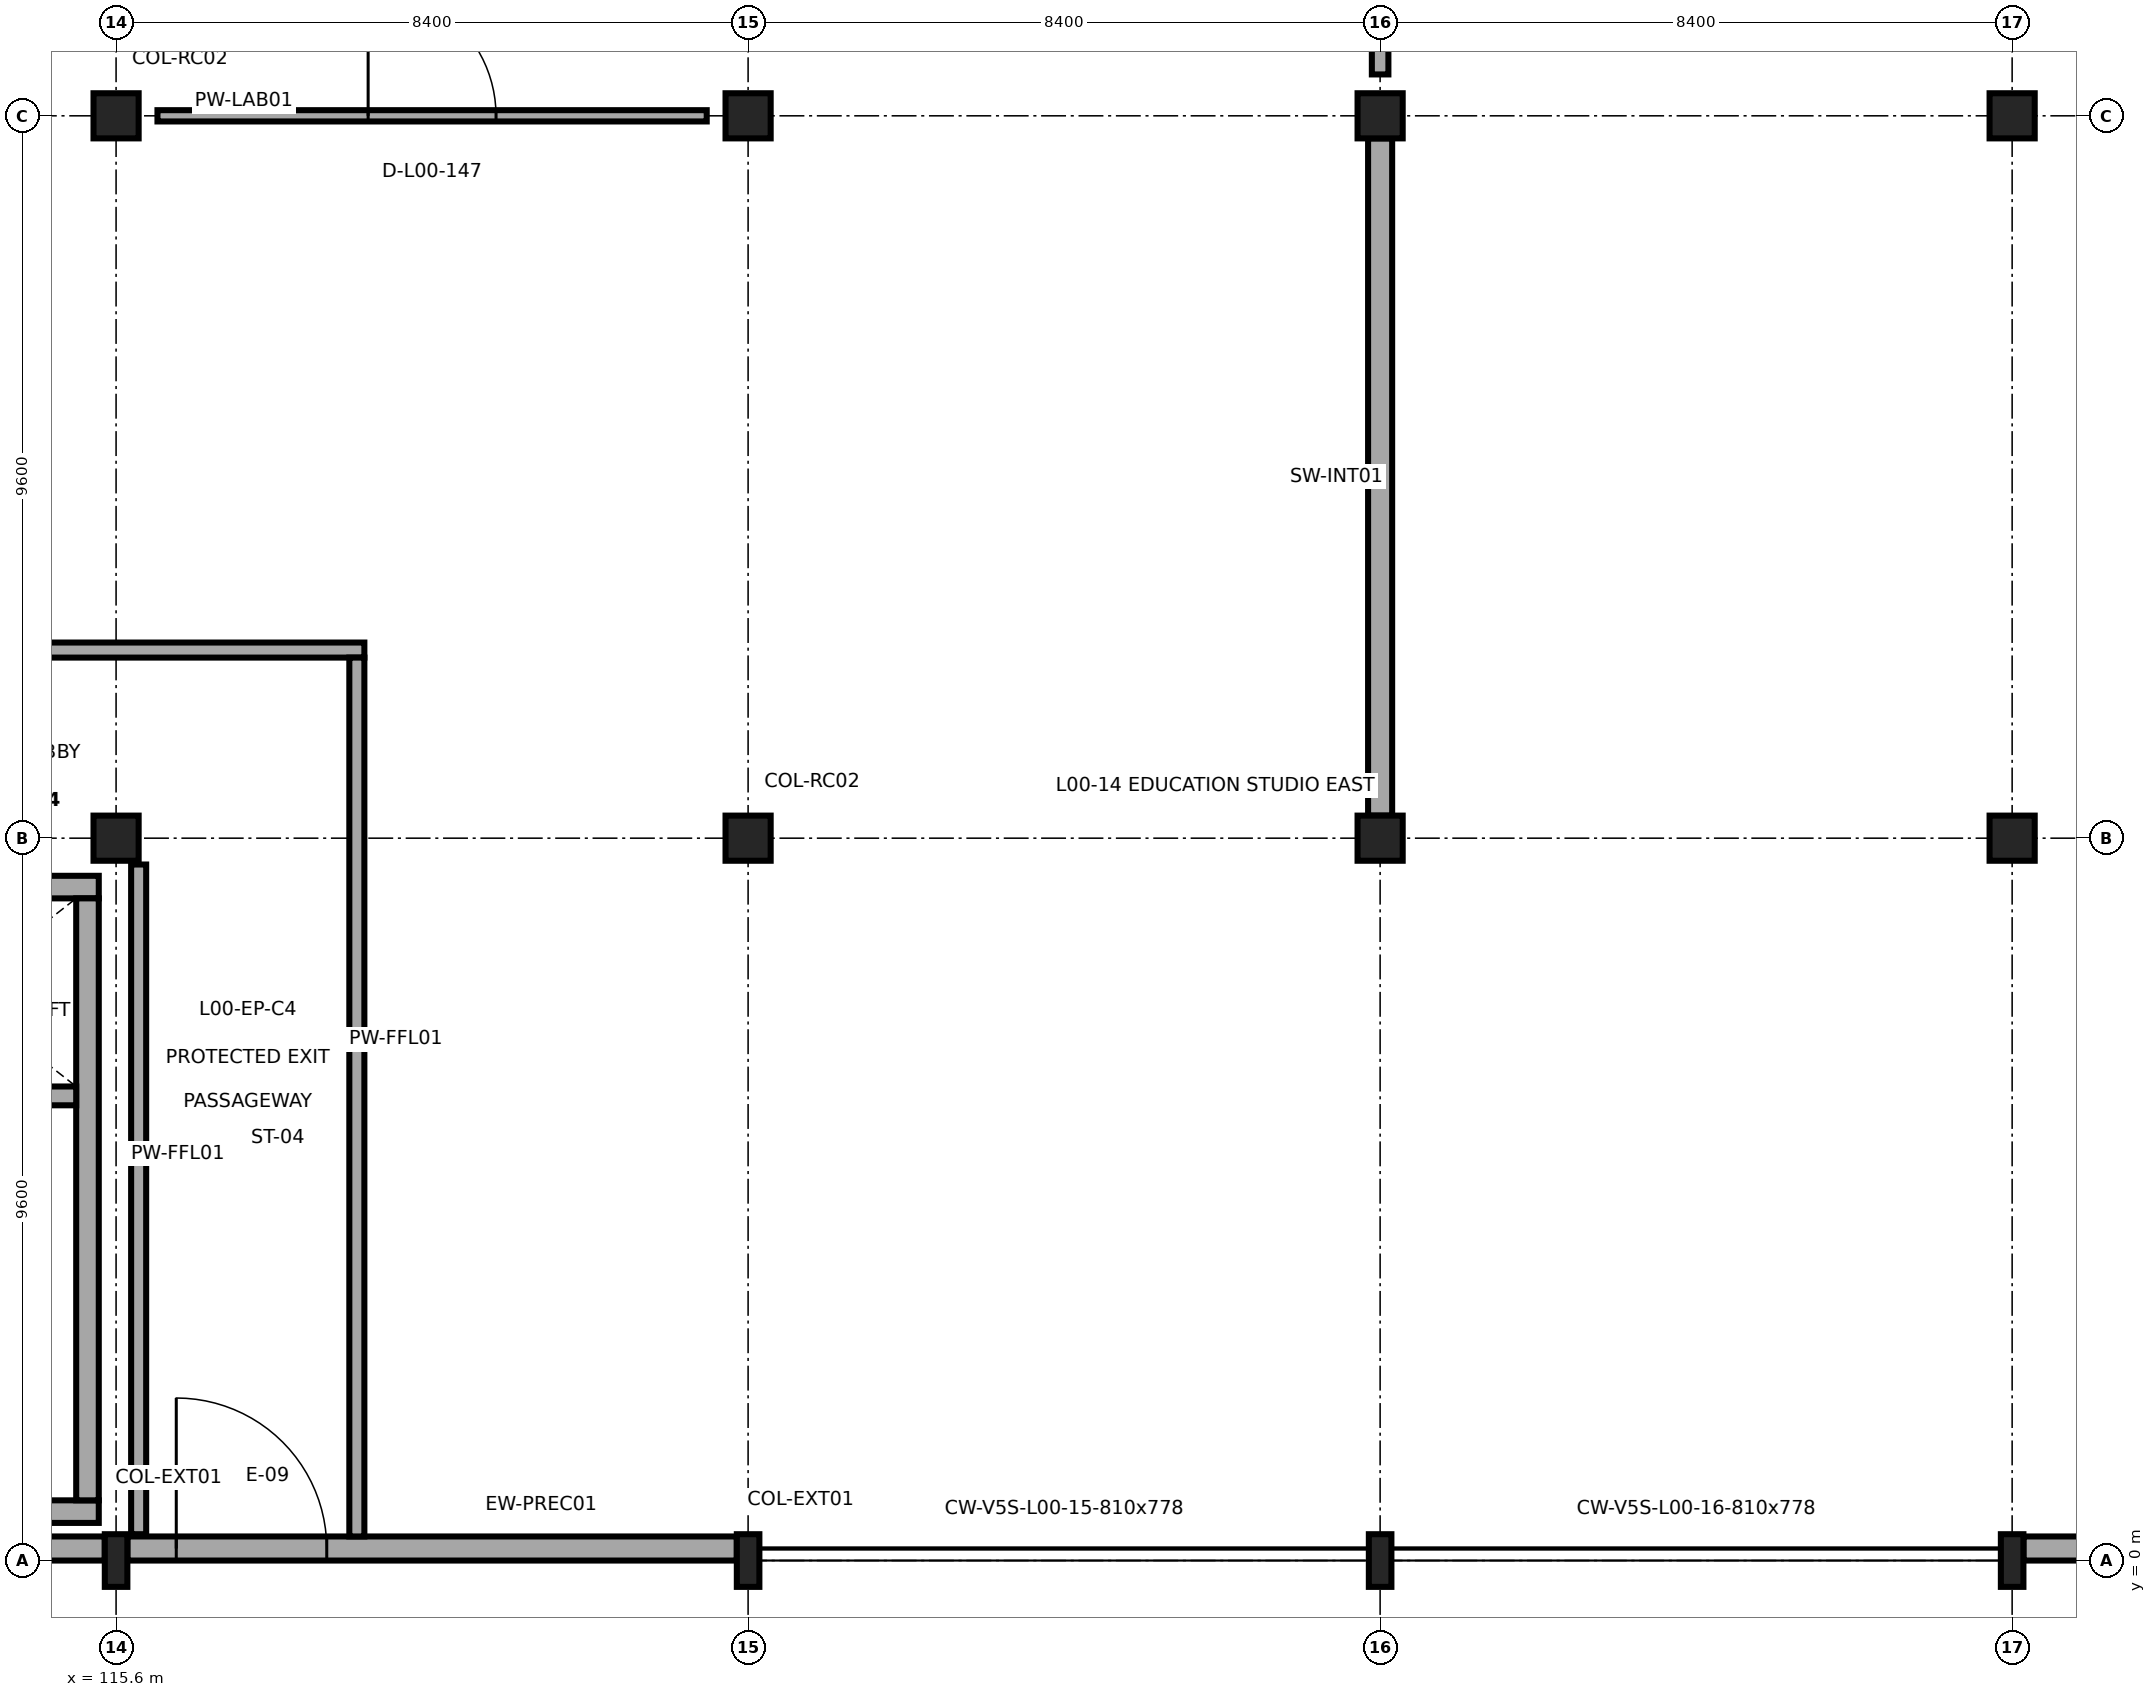
"""IFC4 building model, lengths in metres.
Left out: names, types, materials, properties, quantities, classifications, styles, units other than length and angle.
Written with IfcOpenShell. Run it as: python <this file> out.ifc"""

import sys

from ifc_helpers import new_model, si_unit, direction, frame, frame_2d, origin, origin_2d, place, context, subcontext, project, spatial, rectangle, i_section, extrude, element, fill, save


model = new_model("IFC4")
c1 = context("Model", 3, precision=1e-05, world=origin(), true_north=direction((0.0, 1.0)))
c2 = subcontext(c1, "Body", "Model", "MODEL_VIEW")
j1 = project(units=[si_unit("LENGTHUNIT", "METRE"), si_unit("PLANEANGLEUNIT", "RADIAN")], contexts=[c1])
p1 = place(None, origin())
s1 = spatial("IfcSite", under=j1, at=p1, CompositionType="ELEMENT")
p2 = place(p1, origin())
s2 = spatial("IfcBuilding", under=s1, at=p2, CompositionType="ELEMENT")
p3 = place(p2, origin())
s3 = spatial("IfcBuildingStorey", under=s2, at=p3, CompositionType="ELEMENT", Elevation=0.0)
p4 = place(p3, frame((115.6, 0.0, 0.0), z_axis=(0.0, 0.0, 1.0), x_axis=(1.0, 0.0, 0.0)))
e1 = element("IfcColumn", 1, at=p4, inside=s3, PredefinedType="COLUMN", context=c2, shape_type="SweptSolid", body=[
    extrude(i_section(OverallWidth=0.3, OverallDepth=0.7, WebThickness=0.017, FlangeThickness=0.032, FilletRadius=0.027, at=origin_2d()), origin(), (0.0, 0.0, 1.0), 8.4),
])
for number, where, z_axis, x_axis in (
    (2, (115.6, 9.6, 0.0), (0.0, 0.0, 1.0), (1.0, 0.0, 0.0)),
    (3, (115.6, 19.2, 0.0), (0.0, 0.0, 1.0), (1.0, 0.0, 0.0)),
):
    element("IfcColumn", number, at=place(p3, frame(where, z_axis=z_axis, x_axis=x_axis)), inside=s3, PredefinedType="COLUMN", context=c2, shape_type="SweptSolid", body=[
        extrude(rectangle(XDim=0.6, YDim=0.6, at=origin_2d()), origin(), (0.0, 0.0, 1.0), 8.4),
    ])
p5 = place(p3, frame((124.0, 0.0, 0.0), z_axis=(0.0, 0.0, 1.0), x_axis=(1.0, 0.0, 0.0)))
e4 = element("IfcColumn", 4, at=p5, inside=s3, PredefinedType="COLUMN", context=c2, shape_type="SweptSolid", body=[
    extrude(i_section(OverallWidth=0.3, OverallDepth=0.7, WebThickness=0.017, FlangeThickness=0.032, FilletRadius=0.027, at=origin_2d()), origin(), (0.0, 0.0, 1.0), 8.4),
])
for number, where, z_axis, x_axis in (
    (5, (124.0, 9.6, 0.0), (0.0, 0.0, 1.0), (1.0, 0.0, 0.0)),
    (6, (124.0, 19.2, 0.0), (0.0, 0.0, 1.0), (1.0, 0.0, 0.0)),
):
    element("IfcColumn", number, at=place(p3, frame(where, z_axis=z_axis, x_axis=x_axis)), inside=s3, PredefinedType="COLUMN", context=c2, shape_type="SweptSolid", body=[
        extrude(rectangle(XDim=0.6, YDim=0.6, at=origin_2d()), origin(), (0.0, 0.0, 1.0), 8.4),
    ])
p6 = place(p3, frame((132.4, 0.0, 0.0), z_axis=(0.0, 0.0, 1.0), x_axis=(1.0, 0.0, 0.0)))
e7 = element("IfcColumn", 7, at=p6, inside=s3, PredefinedType="COLUMN", context=c2, shape_type="SweptSolid", body=[
    extrude(i_section(OverallWidth=0.3, OverallDepth=0.7, WebThickness=0.017, FlangeThickness=0.032, FilletRadius=0.027, at=origin_2d()), origin(), (0.0, 0.0, 1.0), 8.4),
])
for number, where, z_axis, x_axis in (
    (8, (132.4, 9.6, 0.0), (0.0, 0.0, 1.0), (1.0, 0.0, 0.0)),
    (9, (132.4, 19.2, 0.0), (0.0, 0.0, 1.0), (1.0, 0.0, 0.0)),
):
    element("IfcColumn", number, at=place(p3, frame(where, z_axis=z_axis, x_axis=x_axis)), inside=s3, PredefinedType="COLUMN", context=c2, shape_type="SweptSolid", body=[
        extrude(rectangle(XDim=0.6, YDim=0.6, at=origin_2d()), origin(), (0.0, 0.0, 1.0), 8.4),
    ])
p7 = place(p3, frame((140.8, 0.0, 0.0), z_axis=(0.0, 0.0, 1.0), x_axis=(1.0, 0.0, 0.0)))
e10 = element("IfcColumn", 10, at=p7, inside=s3, PredefinedType="COLUMN", context=c2, shape_type="SweptSolid", body=[
    extrude(i_section(OverallWidth=0.3, OverallDepth=0.7, WebThickness=0.017, FlangeThickness=0.032, FilletRadius=0.027, at=origin_2d()), origin(), (0.0, 0.0, 1.0), 8.4),
])
for number, where, z_axis, x_axis in (
    (11, (140.8, 9.6, 0.0), (0.0, 0.0, 1.0), (1.0, 0.0, 0.0)),
    (12, (140.8, 19.2, 0.0), (0.0, 0.0, 1.0), (1.0, 0.0, 0.0)),
):
    element("IfcColumn", number, at=place(p3, frame(where, z_axis=z_axis, x_axis=x_axis)), inside=s3, PredefinedType="COLUMN", context=c2, shape_type="SweptSolid", body=[
        extrude(rectangle(XDim=0.6, YDim=0.6, at=origin_2d()), origin(), (0.0, 0.0, 1.0), 8.4),
    ])
p8 = place(p3, frame((107.625, 0.16, 0.0), z_axis=(0.0, 0.0, 1.0), x_axis=(1.0, 0.0, 0.0)))
e13 = element("IfcWall", 13, at=p8, inside=s3, PredefinedType="SOLIDWALL", context=c2, shape_type="SweptSolid", body=[
    extrude(rectangle(XDim=7.825, YDim=0.32, at=frame_2d((3.913, 0.0))), origin(), (0.0, 0.0, 1.0), 6.92),
])
p9 = place(p3, frame((115.75, 0.16, 0.0), z_axis=(0.0, 0.0, 1.0), x_axis=(1.0, 0.0, 0.0)))
e14 = element("IfcWall", 14, at=p9, inside=s3, PredefinedType="SOLIDWALL", context=c2, shape_type="SweptSolid", body=[
    extrude(rectangle(XDim=8.1, YDim=0.32, at=frame_2d((4.05, 0.0))), origin(), (0.0, 0.0, 1.0), 7.78),
])
p10 = place(p9, frame((0.65, 0.0, 0.0)))
e15 = element("IfcOpeningElement", 15, at=p10, cuts=e14, PredefinedType="OPENING", context=c2, shape_type="SweptSolid", body=[
    extrude(rectangle(XDim=2.0, YDim=2.4, at=frame_2d((1.0, 1.2))), frame((0.0, 0.17, 0.0), z_axis=(0.0, -1.0, 0.0), x_axis=(1.0, 0.0, 0.0)), (0.0, 0.0, 1.0), 0.34),
])
p11 = place(p3, frame((140.95, 0.16, 0.0), z_axis=(0.0, 0.0, 1.0), x_axis=(1.0, 0.0, 0.0)))
e16 = element("IfcWall", 16, at=p11, inside=s3, PredefinedType="SOLIDWALL", context=c2, shape_type="SweptSolid", body=[
    extrude(rectangle(XDim=8.1, YDim=0.32, at=frame_2d((4.05, 0.0))), origin(), (0.0, 0.0, 1.0), 7.78),
])
p12 = place(p11, frame((3.225, 0.0, 1.0)))
e17 = element("IfcOpeningElement", 17, at=p12, cuts=e16, PredefinedType="OPENING", context=c2, shape_type="SweptSolid", body=[
    extrude(rectangle(XDim=1.65, YDim=2.25, at=frame_2d((0.825, 1.125))), frame((0.0, 0.17, 0.0), z_axis=(0.0, -1.0, 0.0), x_axis=(1.0, 0.0, 0.0)), (0.0, 0.0, 1.0), 0.34),
])
p13 = place(p3, frame((107.43, 0.65, 0.0), z_axis=(0.0, 0.0, 1.0), x_axis=(1.0, 0.0, 0.0)))
e18 = element("IfcWall", 18, at=p13, inside=s3, PredefinedType="SHEAR", context=c2, shape_type="SweptSolid", body=[
    extrude(rectangle(XDim=7.94, YDim=0.3, at=frame_2d((3.97, 0.0))), origin(), (0.0, 0.0, 1.0), 8.15),
])
p14 = place(p3, frame((115.37, 8.95, 0.0), z_axis=(0.0, 0.0, 1.0), x_axis=(-1.0, 0.0, 0.0)))
e19 = element("IfcWall", 19, at=p14, inside=s3, PredefinedType="SHEAR", context=c2, shape_type="SweptSolid", body=[
    extrude(rectangle(XDim=7.94, YDim=0.3, at=frame_2d((3.97, 0.0))), origin(), (0.0, 0.0, 1.0), 8.15),
])
p15 = place(p14, frame((5.17, 0.0, 0.0)))
e20 = element("IfcOpeningElement", 20, at=p15, cuts=e19, PredefinedType="OPENING", context=c2, shape_type="SweptSolid", body=[
    extrude(rectangle(XDim=1.1, YDim=2.2, at=frame_2d((0.55, 1.1))), frame((0.0, 0.16, 0.0), z_axis=(0.0, -1.0, 0.0), x_axis=(1.0, 0.0, 0.0)), (0.0, 0.0, 1.0), 0.32),
])
p16 = place(p14, frame((1.35, 0.0, 0.0)))
e21 = element("IfcOpeningElement", 21, at=p16, cuts=e19, PredefinedType="OPENING", context=c2, shape_type="SweptSolid", body=[
    extrude(rectangle(XDim=1.1, YDim=2.1, at=frame_2d((0.55, 1.05))), frame((0.0, 0.16, 0.0), z_axis=(0.0, -1.0, 0.0), x_axis=(1.0, 0.0, 0.0)), (0.0, 0.0, 1.0), 0.32),
])
p17 = place(p3, frame((115.22, 0.8, 0.0), z_axis=(0.0, 0.0, 1.0), x_axis=(0.0, 1.0, 0.0)))
e22 = element("IfcWall", 22, at=p17, inside=s3, PredefinedType="SHEAR", context=c2, shape_type="SweptSolid", body=[
    extrude(rectangle(XDim=8.0, YDim=0.3, at=frame_2d((4.0, 0.0))), origin(), (0.0, 0.0, 1.0), 8.15),
])
p18 = place(p3, frame((111.87, 6.175, 0.0), z_axis=(0.0, 0.0, 1.0), x_axis=(1.0, 0.0, 0.0)))
e23 = element("IfcWall", 23, at=p18, inside=s3, PredefinedType="SHEAR", context=c2, shape_type="SweptSolid", body=[
    extrude(rectangle(XDim=3.2, YDim=0.25, at=frame_2d((1.6, 0.0))), origin(), (0.0, 0.0, 1.0), 8.15),
])
p19 = place(p3, frame((107.43, 12.1, 0.0), z_axis=(0.0, 0.0, 1.0), x_axis=(1.0, 0.0, 0.0)))
e24 = element("IfcWall", 24, at=p19, inside=s3, PredefinedType="SOLIDWALL", context=c2, shape_type="SweptSolid", body=[
    extrude(rectangle(XDim=11.47, YDim=0.2, at=frame_2d((5.735, 0.0))), origin(), (0.0, 0.0, 1.0), 7.532),
])
p20 = place(p19, frame((3.07, 0.0, 0.0)))
e25 = element("IfcOpeningElement", 25, at=p20, cuts=e24, PredefinedType="OPENING", context=c2, shape_type="SweptSolid", body=[
    extrude(rectangle(XDim=1.8, YDim=2.2, at=frame_2d((0.9, 1.1))), frame((0.0, 0.11, 0.0), z_axis=(0.0, -1.0, 0.0), x_axis=(1.0, 0.0, 0.0)), (0.0, 0.0, 1.0), 0.22),
])
p21 = place(p3, frame((118.8, 12.0, 0.0), z_axis=(0.0, 0.0, 1.0), x_axis=(0.0, -1.0, 0.0)))
e26 = element("IfcWall", 26, at=p21, inside=s3, PredefinedType="SOLIDWALL", context=c2, shape_type="SweptSolid", body=[
    extrude(rectangle(XDim=11.68, YDim=0.2, at=frame_2d((5.84, 0.0))), origin(), (0.0, 0.0, 1.0), 7.582),
])
p22 = place(p3, frame((115.9, 0.35, 0.0), z_axis=(0.0, 0.0, 1.0), x_axis=(0.0, 1.0, 0.0)))
e27 = element("IfcWall", 27, at=p22, inside=s3, PredefinedType="SOLIDWALL", context=c2, shape_type="SweptSolid", body=[
    extrude(rectangle(XDim=8.9, YDim=0.2, at=frame_2d((4.45, 0.0))), origin(), (0.0, 0.0, 1.0), 8.135),
])
p23 = place(p3, frame((132.4, 9.9, 0.0), z_axis=(0.0, 0.0, 1.0), x_axis=(0.0, 1.0, 0.0)))
e28 = element("IfcWall", 28, at=p23, inside=s3, PredefinedType="SHEAR", context=c2, shape_type="SweptSolid", body=[
    extrude(rectangle(XDim=9.0, YDim=0.32, at=frame_2d((4.5, 0.0))), origin(), (0.0, 0.0, 1.0), 8.15),
])
p24 = place(p3, frame((116.15, 19.2, 0.0), z_axis=(0.0, 0.0, 1.0), x_axis=(1.0, 0.0, 0.0)))
e29 = element("IfcWall", 29, at=p24, inside=s3, PredefinedType="PARTITIONING", context=c2, shape_type="SweptSolid", body=[
    extrude(rectangle(XDim=7.3, YDim=0.15, at=frame_2d((3.65, 0.0))), origin(), (0.0, 0.0, 1.0), 7.582),
])
p25 = place(p24, frame((2.8, 0.0, 0.0)))
e30 = element("IfcOpeningElement", 30, at=p25, cuts=e29, PredefinedType="OPENING", context=c2, shape_type="SweptSolid", body=[
    extrude(rectangle(XDim=1.7, YDim=2.35, at=frame_2d((0.85, 1.175))), frame((0.0, 0.085, 0.0), z_axis=(0.0, -1.0, 0.0), x_axis=(1.0, 0.0, 0.0)), (0.0, 0.0, 1.0), 0.17),
])
p26 = place(p3, frame((132.4, 19.75, 0.0), z_axis=(0.0, 0.0, 1.0), x_axis=(0.0, 1.0, 0.0)))
e31 = element("IfcWall", 31, at=p26, inside=s3, PredefinedType="PARTITIONING", context=c2, shape_type="SweptSolid", body=[
    extrude(rectangle(XDim=6.1, YDim=0.22, at=frame_2d((3.05, 0.0))), origin(), (0.0, 0.0, 1.0), 7.582),
])
p27 = place(p26, frame((1.85, 0.0, 0.0)))
e32 = element("IfcOpeningElement", 32, at=p27, cuts=e31, PredefinedType="OPENING", context=c2, shape_type="SweptSolid", body=[
    extrude(rectangle(XDim=2.4, YDim=2.6, at=frame_2d((1.2, 1.3))), frame((0.0, 0.12, 0.0), z_axis=(0.0, -1.0, 0.0), x_axis=(1.0, 0.0, 0.0)), (0.0, 0.0, 1.0), 0.24),
])
p28 = place(p10, frame((2.0, 0.0, 0.0), z_axis=(0.0, 0.0, 1.0), x_axis=(-1.0, 0.0, 0.0)))
e33 = element("IfcDoor", 33, at=p28, inside=s3, OperationType="DOUBLE_DOOR_SINGLE_SWING", PredefinedType="DOOR", context=c2, shape_type="SweptSolid", body=[
    extrude(rectangle(XDim=2.0, YDim=2.4, at=frame_2d((1.0, 1.2))), frame((0.0, 0.025, 0.0), z_axis=(0.0, -1.0, 0.0), x_axis=(1.0, 0.0, 0.0)), (0.0, 0.0, 1.0), 0.05),
])
fill(e15, e33)
p29 = place(p25, origin())
e34 = element("IfcDoor", 34, at=p29, inside=s3, OperationType="DOUBLE_DOOR_SINGLE_SWING", PredefinedType="DOOR", context=c2, shape_type="SweptSolid", body=[
    extrude(rectangle(XDim=1.7, YDim=2.35, at=frame_2d((0.85, 1.175))), frame((0.0, 0.025, 0.0), z_axis=(0.0, -1.0, 0.0), x_axis=(1.0, 0.0, 0.0)), (0.0, 0.0, 1.0), 0.05),
])
fill(e30, e34)
save(model, sys.argv[1])
